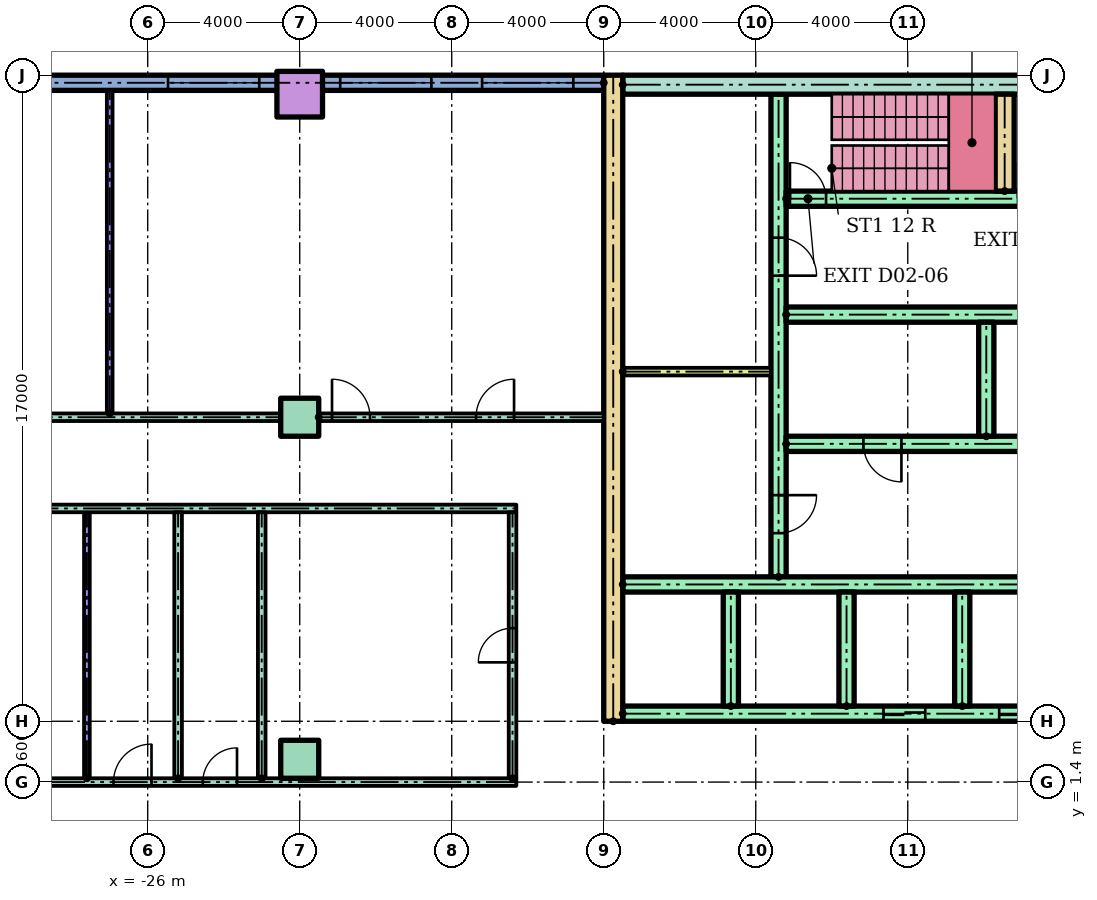
"""IFC4 building model, lengths in metres.
Left out: names, types, materials, properties, quantities, classifications, styles, units other than length and angle.
Written with IfcOpenShell. Run it as: python <this file> out.ifc"""

import sys

from ifc_helpers import new_model, si_unit, direction, frame, frame_2d, origin, origin_2d, place, context, subcontext, project, spatial, rectangle, hollow_rectangle, extrude, element, fill, save


model = new_model("IFC4")
c1 = context("Model", 3, precision=1e-05, world=origin(), true_north=direction((0.0, 1.0)))
c2 = subcontext(c1, "Body", "Model", "MODEL_VIEW")
j1 = project(units=[si_unit("LENGTHUNIT", "METRE"), si_unit("PLANEANGLEUNIT", "RADIAN")], contexts=[c1])
p1 = place(None, origin())
s1 = spatial("IfcSite", under=j1, at=p1, CompositionType="ELEMENT")
p2 = place(p1, origin())
s2 = spatial("IfcBuilding", under=s1, at=p2, CompositionType="ELEMENT")
p3 = place(p2, frame((0.0, 0.0, 10.0)))
s3 = spatial("IfcBuildingStorey", under=s2, at=p3, CompositionType="ELEMENT", Elevation=10.0)
for number, where in (
    (1, (-22.0, 2.0, 0.0)),
    (2, (-22.0, 11.0, 0.0)),
):
    element("IfcColumn", number, at=place(p3, frame(where)), inside=s3, PredefinedType="COLUMN", context=c2, shape_type="SweptSolid", body=[
        extrude(rectangle(XDim=1.0, YDim=1.0, at=origin_2d()), origin(), (0.0, 0.0, 1.0), 4.0),
    ])
p4 = place(p3, frame((-22.0, 19.5, 0.0)))
e3 = element("IfcColumn", 3, at=p4, inside=s3, PredefinedType="COLUMN", context=c2, shape_type="SweptSolid", body=[
    extrude(hollow_rectangle(XDim=1.2, YDim=1.2, WallThickness=0.06, at=origin_2d()), origin(), (0.0, 0.0, 1.0), 4.0),
])
p5 = place(p3, frame((-14.0, 19.8, 0.0), z_axis=(0.0, 0.0, 1.0), x_axis=(-1.0, 0.0, 0.0)))
e4 = element("IfcWall", 4, at=p5, inside=s3, PredefinedType="STANDARD", context=c2, shape_type="SweptSolid", body=[
    extrude(rectangle(XDim=25.6, YDim=0.4, at=frame_2d((12.8, 0.0))), origin(), (0.0, 0.0, 1.0), 3.7),
])
p6 = place(p5, frame((0.8, 0.0, 0.9)))
e5 = element("IfcOpeningElement", 5, at=p6, cuts=e4, PredefinedType="OPENING", context=c2, shape_type="SweptSolid", body=[
    extrude(rectangle(XDim=2.4, YDim=2.1, at=frame_2d((1.2, 1.05))), frame((0.0, 0.21, 0.0), z_axis=(0.0, -1.0, 0.0), x_axis=(1.0, 0.0, 0.0)), (0.0, 0.0, 1.0), 0.42),
])
p7 = place(p5, frame((4.535, 0.0, 0.9)))
e6 = element("IfcOpeningElement", 6, at=p7, cuts=e4, PredefinedType="OPENING", context=c2, shape_type="SweptSolid", body=[
    extrude(rectangle(XDim=2.4, YDim=2.1, at=frame_2d((1.2, 1.05))), frame((0.0, 0.21, 0.0), z_axis=(0.0, -1.0, 0.0), x_axis=(1.0, 0.0, 0.0)), (0.0, 0.0, 1.0), 0.42),
])
p8 = place(p5, frame((9.065, 0.0, 0.9)))
e7 = element("IfcOpeningElement", 7, at=p8, cuts=e4, PredefinedType="OPENING", context=c2, shape_type="SweptSolid", body=[
    extrude(rectangle(XDim=2.4, YDim=2.1, at=frame_2d((1.2, 1.05))), frame((0.0, 0.21, 0.0), z_axis=(0.0, -1.0, 0.0), x_axis=(1.0, 0.0, 0.0)), (0.0, 0.0, 1.0), 0.42),
])
p9 = place(p5, frame((20.8, 0.0, 0.9)))
e8 = element("IfcOpeningElement", 8, at=p9, cuts=e4, PredefinedType="OPENING", context=c2, shape_type="SweptSolid", body=[
    extrude(rectangle(XDim=2.4, YDim=2.1, at=frame_2d((1.2, 1.05))), frame((0.0, 0.21, 0.0), z_axis=(0.0, -1.0, 0.0), x_axis=(1.0, 0.0, 0.0)), (0.0, 0.0, 1.0), 0.42),
])
p10 = place(p3, frame((-13.75, 3.0, 0.0), z_axis=(0.0, 0.0, 1.0), x_axis=(0.0, 1.0, 0.0)))
e9 = element("IfcWall", 9, at=p10, inside=s3, PredefinedType="SHEAR", context=c2, shape_type="SweptSolid", body=[
    extrude(rectangle(XDim=17.0, YDim=0.5, at=frame_2d((8.5, 0.0))), origin(), (0.0, 0.0, 1.0), 3.7),
])
p11 = place(p3, frame((-13.5, 19.75, 0.0)))
e10 = element("IfcWall", 10, at=p11, inside=s3, PredefinedType="SHEAR", context=c2, shape_type="SweptSolid", body=[
    extrude(rectangle(XDim=27.0, YDim=0.5, at=frame_2d((13.5, 0.0))), origin(), (0.0, 0.0, 1.0), 3.7),
])
p12 = place(p3, frame((-9.4, 6.8, 0.0), z_axis=(0.0, 0.0, 1.0), x_axis=(0.0, 1.0, 0.0)))
e11 = element("IfcWall", 11, at=p12, inside=s3, PredefinedType="SHEAR", context=c2, shape_type="SweptSolid", body=[
    extrude(rectangle(XDim=12.7, YDim=0.4, at=frame_2d((6.35, 0.0))), origin(), (0.0, 0.0, 1.0), 3.7),
])
p13 = place(p12, frame((1.15, 0.0, 0.0)))
e12 = element("IfcOpeningElement", 12, at=p13, cuts=e11, PredefinedType="OPENING", context=c2, shape_type="SweptSolid", body=[
    extrude(rectangle(XDim=1.0, YDim=2.1, at=frame_2d((0.5, 1.05))), frame((0.0, 0.21, 0.0), z_axis=(0.0, -1.0, 0.0), x_axis=(1.0, 0.0, 0.0)), (0.0, 0.0, 1.0), 0.42),
])
p14 = place(p12, frame((7.925, 0.0, 0.0)))
e13 = element("IfcOpeningElement", 13, at=p14, cuts=e11, PredefinedType="OPENING", context=c2, shape_type="SweptSolid", body=[
    extrude(rectangle(XDim=1.0, YDim=2.1, at=frame_2d((0.5, 1.05))), frame((0.0, 0.21, 0.0), z_axis=(0.0, -1.0, 0.0), x_axis=(1.0, 0.0, 0.0)), (0.0, 0.0, 1.0), 0.42),
])
p15 = place(p3, frame((-13.5, 3.2, 0.0)))
e14 = element("IfcWall", 14, at=p15, inside=s3, PredefinedType="SHEAR", context=c2, shape_type="SweptSolid", body=[
    extrude(rectangle(XDim=27.0, YDim=0.4, at=frame_2d((13.5, 0.0))), origin(), (0.0, 0.0, 1.0), 3.7),
])
p16 = place(p15, frame((6.861, 0.0, 0.0)))
e15 = element("IfcOpeningElement", 15, at=p16, cuts=e14, PredefinedType="OPENING", context=c2, shape_type="SweptSolid", body=[
    extrude(rectangle(XDim=1.1, YDim=2.1, at=frame_2d((0.55, 1.05))), frame((0.0, 0.21, 0.0), z_axis=(0.0, -1.0, 0.0), x_axis=(1.0, 0.0, 0.0)), (0.0, 0.0, 1.0), 0.42),
])
p17 = place(p15, frame((9.906, 0.0, 0.0)))
e16 = element("IfcOpeningElement", 16, at=p17, cuts=e14, PredefinedType="OPENING", context=c2, shape_type="SweptSolid", body=[
    extrude(rectangle(XDim=1.1, YDim=2.1, at=frame_2d((0.55, 1.05))), frame((0.0, 0.21, 0.0), z_axis=(0.0, -1.0, 0.0), x_axis=(1.0, 0.0, 0.0)), (0.0, 0.0, 1.0), 0.42),
])
p18 = place(p15, frame((15.994, 0.0, 0.0)))
e17 = element("IfcOpeningElement", 17, at=p18, cuts=e14, PredefinedType="OPENING", context=c2, shape_type="SweptSolid", body=[
    extrude(rectangle(XDim=1.1, YDim=2.1, at=frame_2d((0.55, 1.05))), frame((0.0, 0.21, 0.0), z_axis=(0.0, -1.0, 0.0), x_axis=(1.0, 0.0, 0.0)), (0.0, 0.0, 1.0), 0.42),
])
p19 = place(p15, frame((19.039, 0.0, 0.0)))
e18 = element("IfcOpeningElement", 18, at=p19, cuts=e14, PredefinedType="OPENING", context=c2, shape_type="SweptSolid", body=[
    extrude(rectangle(XDim=1.1, YDim=2.1, at=frame_2d((0.55, 1.05))), frame((0.0, 0.21, 0.0), z_axis=(0.0, -1.0, 0.0), x_axis=(1.0, 0.0, 0.0)), (0.0, 0.0, 1.0), 0.42),
])
p20 = place(p15, frame((12.6, 0.0, 0.0)))
e19 = element("IfcOpeningElement", 19, at=p20, cuts=e14, PredefinedType="OPENING", context=c2, shape_type="SweptSolid", body=[
    extrude(rectangle(XDim=1.8, YDim=2.1, at=frame_2d((0.9, 1.05))), frame((0.0, 0.21, 0.0), z_axis=(0.0, -1.0, 0.0), x_axis=(1.0, 0.0, 0.0)), (0.0, 0.0, 1.0), 0.42),
])
p21 = place(p3, frame((-13.5, 6.6, 0.0)))
e20 = element("IfcWall", 20, at=p21, inside=s3, PredefinedType="SHEAR", context=c2, shape_type="SweptSolid", body=[
    extrude(rectangle(XDim=11.978, YDim=0.4, at=frame_2d((5.989, 0.0))), origin(), (0.0, 0.0, 1.0), 3.7),
])
for number, where, z_axis, x_axis in (
    (21, (-10.656, 3.4, 0.0), (0.0, 0.0, 1.0), (0.0, 1.0, 0.0)),
    (22, (-7.611, 3.4, 0.0), (0.0, 0.0, 1.0), (0.0, 1.0, 0.0)),
    (23, (-4.567, 3.4, 0.0), (0.0, 0.0, 1.0), (0.0, 1.0, 0.0)),
):
    element("IfcWall", number, at=place(p3, frame(where, z_axis=z_axis, x_axis=x_axis)), inside=s3, PredefinedType="SHEAR", context=c2, shape_type="SweptSolid", body=[
        extrude(rectangle(XDim=3.0, YDim=0.4, at=frame_2d((1.5, 0.0))), origin(), (0.0, 0.0, 1.0), 3.7),
    ])
p22 = place(p3, frame((-9.2, 10.3, 0.0)))
e24 = element("IfcWall", 24, at=p22, inside=s3, PredefinedType="SHEAR", context=c2, shape_type="SweptSolid", body=[
    extrude(rectangle(XDim=8.0, YDim=0.4, at=frame_2d((4.0, 0.0))), origin(), (0.0, 0.0, 1.0), 3.7),
])
p23 = place(p22, frame((2.033, 0.0, 0.0)))
e25 = element("IfcOpeningElement", 25, at=p23, cuts=e24, PredefinedType="OPENING", context=c2, shape_type="SweptSolid", body=[
    extrude(rectangle(XDim=1.0, YDim=2.1, at=frame_2d((0.5, 1.05))), frame((0.0, 0.21, 0.0), z_axis=(0.0, -1.0, 0.0), x_axis=(1.0, 0.0, 0.0)), (0.0, 0.0, 1.0), 0.42),
])
p24 = place(p22, frame((6.133, 0.0, 0.0)))
e26 = element("IfcOpeningElement", 26, at=p24, cuts=e24, PredefinedType="OPENING", context=c2, shape_type="SweptSolid", body=[
    extrude(rectangle(XDim=1.0, YDim=2.1, at=frame_2d((0.5, 1.05))), frame((0.0, 0.21, 0.0), z_axis=(0.0, -1.0, 0.0), x_axis=(1.0, 0.0, 0.0)), (0.0, 0.0, 1.0), 0.42),
])
p25 = place(p3, frame((-9.2, 13.7, 0.0)))
e27 = element("IfcWall", 27, at=p25, inside=s3, PredefinedType="SHEAR", context=c2, shape_type="SweptSolid", body=[
    extrude(rectangle(XDim=8.0, YDim=0.4, at=frame_2d((4.0, 0.0))), origin(), (0.0, 0.0, 1.0), 3.7),
])
p26 = place(p3, frame((-3.933, 10.5, 0.0), z_axis=(0.0, 0.0, 1.0), x_axis=(0.0, 1.0, 0.0)))
e28 = element("IfcWall", 28, at=p26, inside=s3, PredefinedType="SHEAR", context=c2, shape_type="SweptSolid", body=[
    extrude(rectangle(XDim=3.0, YDim=0.4, at=frame_2d((1.5, 0.0))), origin(), (0.0, 0.0, 1.0), 3.7),
])
p27 = place(p3, frame((-9.2, 16.75, 0.0)))
e29 = element("IfcWall", 29, at=p27, inside=s3, PredefinedType="SHEAR", context=c2, shape_type="SweptSolid", body=[
    extrude(rectangle(XDim=18.4, YDim=0.4, at=frame_2d((9.2, 0.0))), origin(), (0.0, 0.0, 1.0), 3.7),
])
p28 = place(p27, frame((0.1, 0.0, 0.0)))
e30 = element("IfcOpeningElement", 30, at=p28, cuts=e29, PredefinedType="OPENING", context=c2, shape_type="SweptSolid", body=[
    extrude(rectangle(XDim=0.95, YDim=2.1, at=frame_2d((0.475, 1.05))), frame((0.0, 0.21, 0.0), z_axis=(0.0, -1.0, 0.0), x_axis=(1.0, 0.0, 0.0)), (0.0, 0.0, 1.0), 0.42),
])
p29 = place(p27, frame((6.1, 0.0, 0.0)))
e31 = element("IfcOpeningElement", 31, at=p29, cuts=e29, PredefinedType="OPENING", context=c2, shape_type="SweptSolid", body=[
    extrude(rectangle(XDim=0.95, YDim=2.1, at=frame_2d((0.475, 1.05))), frame((0.0, 0.21, 0.0), z_axis=(0.0, -1.0, 0.0), x_axis=(1.0, 0.0, 0.0)), (0.0, 0.0, 1.0), 0.42),
])
p30 = place(p27, frame((12.1, 0.0, 0.0)))
e32 = element("IfcOpeningElement", 32, at=p30, cuts=e29, PredefinedType="OPENING", context=c2, shape_type="SweptSolid", body=[
    extrude(rectangle(XDim=0.95, YDim=2.1, at=frame_2d((0.475, 1.05))), frame((0.0, 0.21, 0.0), z_axis=(0.0, -1.0, 0.0), x_axis=(1.0, 0.0, 0.0)), (0.0, 0.0, 1.0), 0.42),
])
p31 = place(p3, frame((-3.45, 16.95, 0.0), z_axis=(0.0, 0.0, 1.0), x_axis=(0.0, 1.0, 0.0)))
e33 = element("IfcWall", 33, at=p31, inside=s3, PredefinedType="SHEAR", context=c2, shape_type="SweptSolid", body=[
    extrude(rectangle(XDim=2.55, YDim=0.5, at=frame_2d((1.275, 0.0))), origin(), (0.0, 0.0, 1.0), 3.7),
])
p32 = place(p3, frame((-13.5, 12.2, 0.0)))
e34 = element("IfcWall", 34, at=p32, inside=s3, PredefinedType="PARTITIONING", context=c2, shape_type="SweptSolid", body=[
    extrude(rectangle(XDim=3.9, YDim=0.2, at=frame_2d((1.95, 0.0))), origin(), (0.0, 0.0, 1.0), 3.7),
])
p33 = place(p3, frame((-36.9, 1.4, 0.0)))
e35 = element("IfcWall", 35, at=p33, inside=s3, PredefinedType="PARTITIONING", context=c2, shape_type="SweptSolid", body=[
    extrude(rectangle(XDim=20.6, YDim=0.2, at=frame_2d((10.3, 0.0))), origin(), (0.0, 0.0, 1.0), 3.7),
])
p34 = place(p33, frame((1.3, 0.0, 0.0)))
e36 = element("IfcOpeningElement", 36, at=p34, cuts=e35, PredefinedType="OPENING", context=c2, shape_type="SweptSolid", body=[
    extrude(rectangle(XDim=1.0, YDim=2.1, at=frame_2d((0.5, 1.05))), frame((0.0, 0.11, 0.0), z_axis=(0.0, -1.0, 0.0), x_axis=(1.0, 0.0, 0.0)), (0.0, 0.0, 1.0), 0.22),
])
p35 = place(p33, frame((5.25, 0.0, 0.0)))
e37 = element("IfcOpeningElement", 37, at=p35, cuts=e35, PredefinedType="OPENING", context=c2, shape_type="SweptSolid", body=[
    extrude(rectangle(XDim=1.0, YDim=2.1, at=frame_2d((0.5, 1.05))), frame((0.0, 0.11, 0.0), z_axis=(0.0, -1.0, 0.0), x_axis=(1.0, 0.0, 0.0)), (0.0, 0.0, 1.0), 0.22),
])
p36 = place(p33, frame((10.0, 0.0, 0.0)))
e38 = element("IfcOpeningElement", 38, at=p36, cuts=e35, PredefinedType="OPENING", context=c2, shape_type="SweptSolid", body=[
    extrude(rectangle(XDim=1.0, YDim=2.1, at=frame_2d((0.5, 1.05))), frame((0.0, 0.11, 0.0), z_axis=(0.0, -1.0, 0.0), x_axis=(1.0, 0.0, 0.0)), (0.0, 0.0, 1.0), 0.22),
])
p37 = place(p33, frame((12.35, 0.0, 0.0)))
e39 = element("IfcOpeningElement", 39, at=p37, cuts=e35, PredefinedType="OPENING", context=c2, shape_type="SweptSolid", body=[
    extrude(rectangle(XDim=0.9, YDim=2.1, at=frame_2d((0.45, 1.05))), frame((0.0, 0.11, 0.0), z_axis=(0.0, -1.0, 0.0), x_axis=(1.0, 0.0, 0.0)), (0.0, 0.0, 1.0), 0.22),
])
p38 = place(p3, frame((-37.6, 8.6, 0.0)))
e40 = element("IfcWall", 40, at=p38, inside=s3, PredefinedType="PARTITIONING", context=c2, shape_type="SweptSolid", body=[
    extrude(rectangle(XDim=21.3, YDim=0.2, at=frame_2d((10.65, 0.0))), origin(), (0.0, 0.0, 1.0), 3.7),
])
p39 = place(p3, frame((-29.5, 11.0, 0.0)))
e41 = element("IfcWall", 41, at=p39, inside=s3, PredefinedType="PARTITIONING", context=c2, shape_type="SweptSolid", body=[
    extrude(rectangle(XDim=7.0, YDim=0.2, at=frame_2d((3.5, 0.0))), origin(), (0.0, 0.0, 1.0), 3.7),
])
p40 = place(p3, frame((-21.5, 11.0, 0.0)))
e42 = element("IfcWall", 42, at=p40, inside=s3, PredefinedType="PARTITIONING", context=c2, shape_type="SweptSolid", body=[
    extrude(rectangle(XDim=7.5, YDim=0.2, at=frame_2d((3.75, 0.0))), origin(), (0.0, 0.0, 1.0), 3.7),
])
p41 = place(p40, frame((0.35, 0.0, 0.0)))
e43 = element("IfcOpeningElement", 43, at=p41, cuts=e42, PredefinedType="OPENING", context=c2, shape_type="SweptSolid", body=[
    extrude(rectangle(XDim=1.0, YDim=2.1, at=frame_2d((0.5, 1.05))), frame((0.0, 0.11, 0.0), z_axis=(0.0, -1.0, 0.0), x_axis=(1.0, 0.0, 0.0)), (0.0, 0.0, 1.0), 0.22),
])
p42 = place(p40, frame((4.14, 0.0, 0.0)))
e44 = element("IfcOpeningElement", 44, at=p42, cuts=e42, PredefinedType="OPENING", context=c2, shape_type="SweptSolid", body=[
    extrude(rectangle(XDim=1.0, YDim=2.1, at=frame_2d((0.5, 1.05))), frame((0.0, 0.11, 0.0), z_axis=(0.0, -1.0, 0.0), x_axis=(1.0, 0.0, 0.0)), (0.0, 0.0, 1.0), 0.22),
])
p43 = place(p3, frame((-27.6, 1.5, 0.0), z_axis=(0.0, 0.0, 1.0), x_axis=(0.0, 1.0, 0.0)))
e45 = element("IfcWall", 45, at=p43, inside=s3, PredefinedType="PARTITIONING", context=c2, shape_type="SweptSolid", body=[
    extrude(rectangle(XDim=7.0, YDim=0.15, at=frame_2d((3.5, 0.0))), origin(), (0.0, 0.0, 1.0), 3.7),
])
p44 = place(p3, frame((-27.0, 11.1, 0.0), z_axis=(0.0, 0.0, 1.0), x_axis=(0.0, 1.0, 0.0)))
e46 = element("IfcWall", 46, at=p44, inside=s3, PredefinedType="PARTITIONING", context=c2, shape_type="SweptSolid", body=[
    extrude(rectangle(XDim=8.5, YDim=0.15, at=frame_2d((4.25, 0.0))), origin(), (0.0, 0.0, 1.0), 3.7),
])
for number, where, z_axis, x_axis in (
    (47, (-25.2, 1.5, 0.0), (0.0, 0.0, 1.0), (0.0, 1.0, 0.0)),
    (48, (-23.0, 1.5, 0.0), (0.0, 0.0, 1.0), (0.0, 1.0, 0.0)),
):
    element("IfcWall", number, at=place(p3, frame(where, z_axis=z_axis, x_axis=x_axis)), inside=s3, PredefinedType="PARTITIONING", context=c2, shape_type="SweptSolid", body=[
        extrude(rectangle(XDim=7.0, YDim=0.2, at=frame_2d((3.5, 0.0))), origin(), (0.0, 0.0, 1.0), 3.7),
    ])
p45 = place(p3, frame((-16.4, 1.5, 0.0), z_axis=(0.0, 0.0, 1.0), x_axis=(0.0, 1.0, 0.0)))
e49 = element("IfcWall", 49, at=p45, inside=s3, PredefinedType="PARTITIONING", context=c2, shape_type="SweptSolid", body=[
    extrude(rectangle(XDim=7.0, YDim=0.2, at=frame_2d((3.5, 0.0))), origin(), (0.0, 0.0, 1.0), 3.7),
])
p46 = place(p45, frame((3.05, 0.0, 0.0)))
e50 = element("IfcOpeningElement", 50, at=p46, cuts=e49, PredefinedType="OPENING", context=c2, shape_type="SweptSolid", body=[
    extrude(rectangle(XDim=0.9, YDim=2.1, at=frame_2d((0.45, 1.05))), frame((0.0, 0.11, 0.0), z_axis=(0.0, -1.0, 0.0), x_axis=(1.0, 0.0, 0.0)), (0.0, 0.0, 1.0), 0.22),
])
p47 = place(p6, origin())
e51 = element("IfcWindow", 51, at=p47, inside=s3, PartitioningType="SINGLE_PANEL", PredefinedType="WINDOW", context=c2, shape_type="SweptSolid", body=[
    extrude(rectangle(XDim=2.4, YDim=2.1, at=frame_2d((1.2, 1.05))), frame((0.0, 0.03, 0.0), z_axis=(0.0, -1.0, 0.0), x_axis=(1.0, 0.0, 0.0)), (0.0, 0.0, 1.0), 0.06),
])
fill(e5, e51)
p48 = place(p7, origin())
e52 = element("IfcWindow", 52, at=p48, inside=s3, PartitioningType="SINGLE_PANEL", PredefinedType="WINDOW", context=c2, shape_type="SweptSolid", body=[
    extrude(rectangle(XDim=2.4, YDim=2.1, at=frame_2d((1.2, 1.05))), frame((0.0, 0.03, 0.0), z_axis=(0.0, -1.0, 0.0), x_axis=(1.0, 0.0, 0.0)), (0.0, 0.0, 1.0), 0.06),
])
fill(e6, e52)
p49 = place(p8, origin())
e53 = element("IfcWindow", 53, at=p49, inside=s3, PartitioningType="SINGLE_PANEL", PredefinedType="WINDOW", context=c2, shape_type="SweptSolid", body=[
    extrude(rectangle(XDim=2.4, YDim=2.1, at=frame_2d((1.2, 1.05))), frame((0.0, 0.03, 0.0), z_axis=(0.0, -1.0, 0.0), x_axis=(1.0, 0.0, 0.0)), (0.0, 0.0, 1.0), 0.06),
])
fill(e7, e53)
p50 = place(p16, origin())
e54 = element("IfcDoor", 54, at=p50, inside=s3, OperationType="SLIDING_TO_LEFT", PredefinedType="DOOR", context=c2, shape_type="SweptSolid", body=[
    extrude(rectangle(XDim=1.1, YDim=2.1, at=frame_2d((0.55, 1.05))), frame((0.0, 0.025, 0.0), z_axis=(0.0, -1.0, 0.0), x_axis=(1.0, 0.0, 0.0)), (0.0, 0.0, 1.0), 0.05),
])
fill(e15, e54)
p51 = place(p17, origin())
e55 = element("IfcDoor", 55, at=p51, inside=s3, OperationType="SLIDING_TO_LEFT", PredefinedType="DOOR", context=c2, shape_type="SweptSolid", body=[
    extrude(rectangle(XDim=1.1, YDim=2.1, at=frame_2d((0.55, 1.05))), frame((0.0, 0.025, 0.0), z_axis=(0.0, -1.0, 0.0), x_axis=(1.0, 0.0, 0.0)), (0.0, 0.0, 1.0), 0.05),
])
fill(e16, e55)
p52 = place(p23, frame((1.0, 0.0, 0.0), z_axis=(0.0, 0.0, 1.0), x_axis=(-1.0, 0.0, 0.0)))
e56 = element("IfcDoor", 56, at=p52, inside=s3, OperationType="SINGLE_SWING_RIGHT", PredefinedType="DOOR", context=c2, shape_type="SweptSolid", body=[
    extrude(rectangle(XDim=1.0, YDim=2.1, at=frame_2d((0.5, 1.05))), frame((0.0, 0.025, 0.0), z_axis=(0.0, -1.0, 0.0), x_axis=(1.0, 0.0, 0.0)), (0.0, 0.0, 1.0), 0.05),
])
fill(e25, e56)
p53 = place(p28, origin())
e57 = element("IfcDoor", 57, at=p53, inside=s3, OperationType="SINGLE_SWING_LEFT", PredefinedType="DOOR", context=c2, shape_type="SweptSolid", body=[
    extrude(rectangle(XDim=0.95, YDim=2.1, at=frame_2d((0.475, 1.05))), frame((0.0, 0.025, 0.0), z_axis=(0.0, -1.0, 0.0), x_axis=(1.0, 0.0, 0.0)), (0.0, 0.0, 1.0), 0.05),
])
fill(e30, e57)
p54 = place(p13, frame((1.0, 0.0, 0.0), z_axis=(0.0, 0.0, 1.0), x_axis=(-1.0, 0.0, 0.0)))
e58 = element("IfcDoor", 58, at=p54, inside=s3, OperationType="SINGLE_SWING_RIGHT", PredefinedType="DOOR", context=c2, shape_type="SweptSolid", body=[
    extrude(rectangle(XDim=1.0, YDim=2.1, at=frame_2d((0.5, 1.05))), frame((0.0, 0.025, 0.0), z_axis=(0.0, -1.0, 0.0), x_axis=(1.0, 0.0, 0.0)), (0.0, 0.0, 1.0), 0.05),
])
fill(e12, e58)
p55 = place(p14, frame((1.0, 0.0, 0.0), z_axis=(0.0, 0.0, 1.0), x_axis=(-1.0, 0.0, 0.0)))
e59 = element("IfcDoor", 59, at=p55, inside=s3, OperationType="SINGLE_SWING_LEFT", PredefinedType="DOOR", context=c2, shape_type="SweptSolid", body=[
    extrude(rectangle(XDim=1.0, YDim=2.1, at=frame_2d((0.5, 1.05))), frame((0.0, 0.025, 0.0), z_axis=(0.0, -1.0, 0.0), x_axis=(1.0, 0.0, 0.0)), (0.0, 0.0, 1.0), 0.05),
])
fill(e13, e59)
p56 = place(p36, origin())
e60 = element("IfcDoor", 60, at=p56, inside=s3, OperationType="SINGLE_SWING_RIGHT", PredefinedType="DOOR", context=c2, shape_type="SweptSolid", body=[
    extrude(rectangle(XDim=1.0, YDim=2.1, at=frame_2d((0.5, 1.05))), frame((0.0, 0.025, 0.0), z_axis=(0.0, -1.0, 0.0), x_axis=(1.0, 0.0, 0.0)), (0.0, 0.0, 1.0), 0.05),
])
fill(e38, e60)
p57 = place(p37, origin())
e61 = element("IfcDoor", 61, at=p57, inside=s3, OperationType="SINGLE_SWING_RIGHT", PredefinedType="DOOR", context=c2, shape_type="SweptSolid", body=[
    extrude(rectangle(XDim=0.9, YDim=2.1, at=frame_2d((0.45, 1.05))), frame((0.0, 0.025, 0.0), z_axis=(0.0, -1.0, 0.0), x_axis=(1.0, 0.0, 0.0)), (0.0, 0.0, 1.0), 0.05),
])
fill(e39, e61)
p58 = place(p46, origin())
e62 = element("IfcDoor", 62, at=p58, inside=s3, OperationType="SINGLE_SWING_LEFT", PredefinedType="DOOR", context=c2, shape_type="SweptSolid", body=[
    extrude(rectangle(XDim=0.9, YDim=2.1, at=frame_2d((0.45, 1.05))), frame((0.0, 0.025, 0.0), z_axis=(0.0, -1.0, 0.0), x_axis=(1.0, 0.0, 0.0)), (0.0, 0.0, 1.0), 0.05),
])
fill(e50, e62)
p59 = place(p41, origin())
e63 = element("IfcDoor", 63, at=p59, inside=s3, OperationType="SINGLE_SWING_LEFT", PredefinedType="DOOR", context=c2, shape_type="SweptSolid", body=[
    extrude(rectangle(XDim=1.0, YDim=2.1, at=frame_2d((0.5, 1.05))), frame((0.0, 0.025, 0.0), z_axis=(0.0, -1.0, 0.0), x_axis=(1.0, 0.0, 0.0)), (0.0, 0.0, 1.0), 0.05),
])
fill(e43, e63)
p60 = place(p42, origin())
e64 = element("IfcDoor", 64, at=p60, inside=s3, OperationType="SINGLE_SWING_RIGHT", PredefinedType="DOOR", context=c2, shape_type="SweptSolid", body=[
    extrude(rectangle(XDim=1.0, YDim=2.1, at=frame_2d((0.5, 1.05))), frame((0.0, 0.025, 0.0), z_axis=(0.0, -1.0, 0.0), x_axis=(1.0, 0.0, 0.0)), (0.0, 0.0, 1.0), 0.05),
])
fill(e44, e64)
save(model, sys.argv[1])
